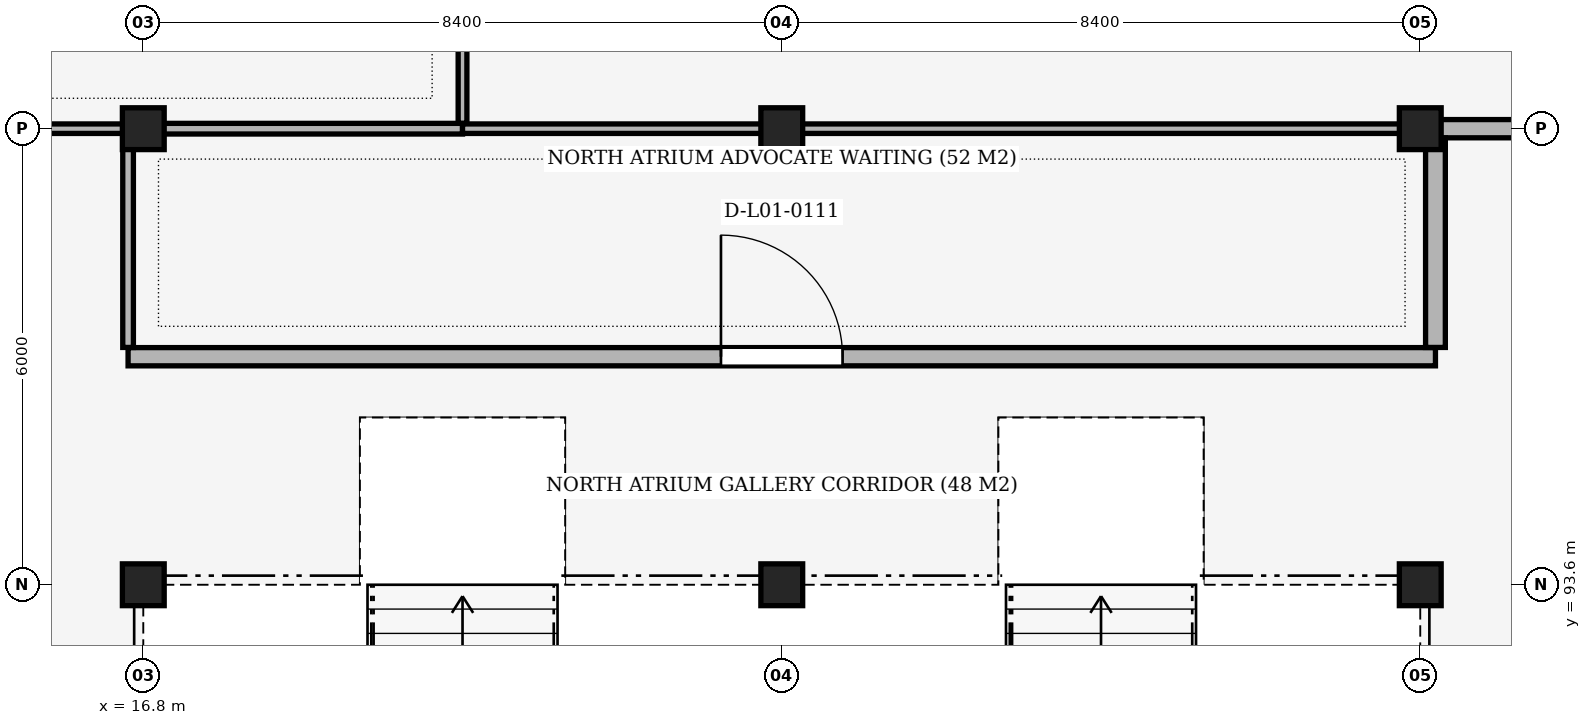
"""IFC4 building model, lengths in metres.
Left out: names, types, materials, properties, quantities, classifications, styles, units other than length and angle.
Written with IfcOpenShell. Run it as: python <this file> out.ifc"""

import sys

from ifc_helpers import new_model, si_unit, direction, frame, frame_2d, origin, origin_2d, place, context, subcontext, project, spatial, rectangle, extrude, element, fill, save


model = new_model("IFC4")
c1 = context("Model", 3, precision=1e-05, world=origin(), true_north=direction((0.0, 1.0)))
c2 = subcontext(c1, "Body", "Model", "MODEL_VIEW")
j1 = project(units=[si_unit("LENGTHUNIT", "METRE"), si_unit("PLANEANGLEUNIT", "RADIAN")], contexts=[c1])
p1 = place(None, origin())
s1 = spatial("IfcSite", under=j1, at=p1, CompositionType="ELEMENT")
p2 = place(p1, origin())
s2 = spatial("IfcBuilding", under=s1, at=p2, CompositionType="ELEMENT")
p3 = place(p2, frame((0.0, 0.0, 5.1)))
s3 = spatial("IfcBuildingStorey", under=s2, at=p3, CompositionType="ELEMENT", Elevation=5.1)
for number, where, z_axis, x_axis in (
    (1, (16.8, 93.6, 0.0), (0.0, 0.0, 1.0), (1.0, 0.0, 0.0)),
    (2, (16.8, 99.6, 0.0), (0.0, 0.0, 1.0), (1.0, 0.0, 0.0)),
    (3, (25.2, 93.6, 0.0), (0.0, 0.0, 1.0), (1.0, 0.0, 0.0)),
    (4, (25.2, 99.6, 0.0), (0.0, 0.0, 1.0), (1.0, 0.0, 0.0)),
    (5, (33.6, 93.6, 0.0), (0.0, 0.0, 1.0), (1.0, 0.0, 0.0)),
    (6, (33.6, 99.6, 0.0), (0.0, 0.0, 1.0), (1.0, 0.0, 0.0)),
):
    element("IfcColumn", number, at=place(p3, frame(where, z_axis=z_axis, x_axis=x_axis)), inside=s3, PredefinedType="COLUMN", context=c2, shape_type="SweptSolid", body=[
        extrude(rectangle(XDim=0.55, YDim=0.55, at=origin_2d()), origin(), (0.0, 0.0, 1.0), 5.1),
    ])
p4 = place(p3, frame((16.6, 96.6, 0.0), z_axis=(0.0, 0.0, 1.0), x_axis=(1.0, 0.0, 0.0)))
e7 = element("IfcWall", 7, at=p4, inside=s3, PredefinedType="PARTITIONING", context=c2, shape_type="SweptSolid", body=[
    extrude(rectangle(XDim=17.2, YDim=0.24, at=frame_2d((8.6, 0.0))), origin(), (0.0, 0.0, 1.0), 4.27),
])
p5 = place(p4, frame((7.8, 0.0, 0.0)))
e8 = element("IfcOpeningElement", 8, at=p5, cuts=e7, PredefinedType="OPENING", context=c2, shape_type="SweptSolid", body=[
    extrude(rectangle(XDim=1.6, YDim=2.3, at=frame_2d((0.8, 1.15))), frame((0.0, 0.135, 0.0), z_axis=(0.0, -1.0, 0.0), x_axis=(1.0, 0.0, 0.0)), (0.0, 0.0, 1.0), 0.27),
])
p6 = place(p3, frame((13.8, 99.6, 0.0), z_axis=(0.0, 0.0, 1.0), x_axis=(1.0, 0.0, 0.0)))
e9 = element("IfcWall", 9, at=p6, inside=s3, PredefinedType="PARTITIONING", context=c2, shape_type="SweptSolid", body=[
    extrude(rectangle(XDim=2.8, YDim=0.125, at=frame_2d((1.4, 0.0))), origin(), (0.0, 0.0, 1.0), 4.12),
])
p7 = place(p6, frame((0.4, 0.0, 0.0)))
e10 = element("IfcOpeningElement", 10, at=p7, cuts=e9, PredefinedType="OPENING", context=c2, shape_type="SweptSolid", body=[
    extrude(rectangle(XDim=1.1, YDim=2.1, at=frame_2d((0.55, 1.05))), frame((0.0, 0.077, 0.0), z_axis=(0.0, -1.0, 0.0), x_axis=(1.0, 0.0, 0.0)), (0.0, 0.0, 1.0), 0.155),
])
p8 = place(p3, frame((33.8, 99.6, 0.0), z_axis=(0.0, 0.0, 1.0), x_axis=(1.0, 0.0, 0.0)))
e11 = element("IfcWall", 11, at=p8, inside=s3, PredefinedType="PARTITIONING", context=c2, shape_type="SweptSolid", body=[
    extrude(rectangle(XDim=2.8, YDim=0.24, at=frame_2d((1.4, 0.0))), origin(), (0.0, 0.0, 1.0), 4.12),
])
p9 = place(p3, frame((16.6, 99.6, 0.0), z_axis=(0.0, 0.0, 1.0), x_axis=(1.0, 0.0, 0.0)))
e12 = element("IfcWall", 12, at=p9, inside=s3, PredefinedType="PARTITIONING", context=c2, shape_type="SweptSolid", body=[
    extrude(rectangle(XDim=4.4, YDim=0.14, at=frame_2d((2.2, 0.0))), origin(), (0.0, 0.0, 1.0), 4.02),
])
p10 = place(p3, frame((21.0, 99.6, 0.0), z_axis=(0.0, 0.0, 1.0), x_axis=(1.0, 0.0, 0.0)))
e13 = element("IfcWall", 13, at=p10, inside=s3, PredefinedType="PARTITIONING", context=c2, shape_type="SweptSolid", body=[
    extrude(rectangle(XDim=12.8, YDim=0.125, at=frame_2d((6.4, 0.0))), origin(), (0.0, 0.0, 1.0), 4.02),
])
p11 = place(p3, frame((16.6, 96.722, 0.0), z_axis=(0.0, 0.0, 1.0), x_axis=(0.0, 1.0, 0.0)))
e14 = element("IfcWall", 14, at=p11, inside=s3, PredefinedType="PARTITIONING", context=c2, shape_type="SweptSolid", body=[
    extrude(rectangle(XDim=2.806, YDim=0.14, at=frame_2d((1.403, 0.0))), origin(), (0.0, 0.0, 1.0), 4.12),
])
p12 = place(p3, frame((21.0, 99.672, 0.0), z_axis=(0.0, 0.0, 1.0), x_axis=(0.0, 1.0, 0.0)))
e15 = element("IfcWall", 15, at=p12, inside=s3, PredefinedType="PARTITIONING", context=c2, shape_type="SweptSolid", body=[
    extrude(rectangle(XDim=18.976, YDim=0.115, at=frame_2d((9.488, 0.0))), origin(), (0.0, 0.0, 1.0), 4.12),
])
p13 = place(p3, frame((33.8, 96.722, 0.0), z_axis=(0.0, 0.0, 1.0), x_axis=(0.0, 1.0, 0.0)))
e16 = element("IfcWall", 16, at=p13, inside=s3, PredefinedType="PARTITIONING", context=c2, shape_type="SweptSolid", body=[
    extrude(rectangle(XDim=2.756, YDim=0.26, at=frame_2d((1.378, 0.0))), origin(), (0.0, 0.0, 1.0), 4.12),
])
p14 = place(p5, origin())
e17 = element("IfcDoor", 17, at=p14, inside=s3, OperationType="SINGLE_SWING_LEFT", PredefinedType="DOOR", context=c2, shape_type="SweptSolid", body=[
    extrude(rectangle(XDim=1.6, YDim=2.3, at=frame_2d((0.8, 1.15))), frame((0.0, 0.025, 0.0), z_axis=(0.0, -1.0, 0.0), x_axis=(1.0, 0.0, 0.0)), (0.0, 0.0, 1.0), 0.05),
])
fill(e8, e17)
save(model, sys.argv[1])
